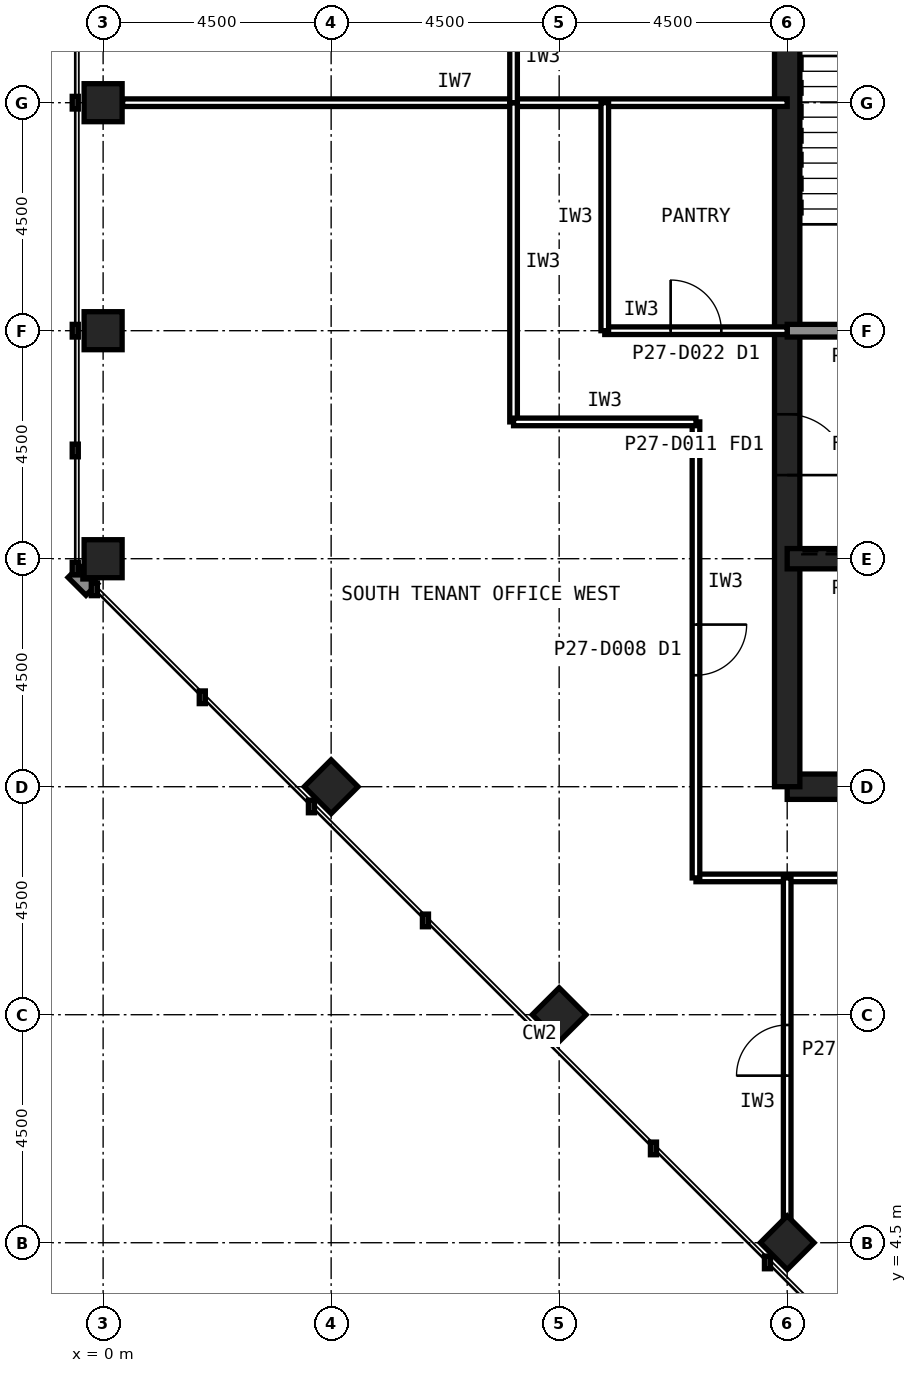
"""IFC4 building model, lengths in metres.
Left out: names, types, materials, properties, quantities, classifications, styles, units other than length and angle.
Written with IfcOpenShell. Run it as: python <this file> out.ifc"""

import sys

from ifc_helpers import new_model, si_unit, direction, frame, frame_2d, origin, origin_2d, place, context, subcontext, project, spatial, rectangle, hollow_rectangle, extrude, element, fill, save


model = new_model("IFC4")
c1 = context("Model", 3, precision=1e-05, world=origin(), true_north=direction((0.0, 1.0)))
c2 = subcontext(c1, "Body", "Model", "MODEL_VIEW")
j1 = project(units=[si_unit("LENGTHUNIT", "METRE"), si_unit("PLANEANGLEUNIT", "RADIAN")], contexts=[c1])
p1 = place(None, origin())
s1 = spatial("IfcSite", under=j1, at=p1, CompositionType="ELEMENT")
p2 = place(p1, origin())
s2 = spatial("IfcBuilding", under=s1, at=p2, CompositionType="ELEMENT")
p3 = place(p2, frame((0.0, 0.0, 119.6)))
s3 = spatial("IfcBuildingStorey", under=s2, at=p3, CompositionType="ELEMENT", Elevation=119.6)
for number, where, z_axis, x_axis in (
    (1, (0.0, 27.0, 0.0), (0.0, 0.0, 1.0), (1.0, 0.0, 0.0)),
    (2, (0.0, 22.5, 0.0), (0.0, 0.0, 1.0), (1.0, 0.0, 0.0)),
    (3, (0.0, 18.0, 0.0), (0.0, 0.0, 1.0), (1.0, 0.0, 0.0)),
    (4, (13.5, 4.5, 0.0), (0.0, 0.0, 1.0), (0.707, 0.707, 0.0)),
    (5, (9.0, 9.0, 0.0), (0.0, 0.0, 1.0), (0.707, 0.707, 0.0)),
    (6, (4.5, 13.5, 0.0), (0.0, 0.0, 1.0), (0.707, 0.707, 0.0)),
):
    element("IfcColumn", number, at=place(p3, frame(where, z_axis=z_axis, x_axis=x_axis)), inside=s3, PredefinedType="COLUMN", context=c2, shape_type="SweptSolid", body=[
        extrude(hollow_rectangle(XDim=0.75, YDim=0.75, WallThickness=0.04, at=origin_2d()), origin(), (0.0, 0.0, 1.0), 4.0),
    ])
p4 = place(p3, frame((13.5, 13.5, 0.0), z_axis=(0.0, 0.0, 1.0), x_axis=(1.0, 0.0, 0.0)))
e7 = element("IfcWall", 7, at=p4, inside=s3, PredefinedType="SHEAR", context=c2, shape_type="SweptSolid", body=[
    extrude(rectangle(XDim=27.0, YDim=0.5, at=frame_2d((13.5, 0.0))), origin(), (0.0, 0.0, 1.0), 4.0),
])
p5 = place(p3, frame((13.5, 40.5, 0.0), z_axis=(0.0, 0.0, 1.0), x_axis=(0.0, -1.0, 0.0)))
e8 = element("IfcWall", 8, at=p5, inside=s3, PredefinedType="SHEAR", context=c2, shape_type="SweptSolid", body=[
    extrude(rectangle(XDim=27.0, YDim=0.5, at=frame_2d((13.5, 0.0))), origin(), (0.0, 0.0, 1.0), 4.0),
])
p6 = place(p5, frame((19.65, 0.0, 0.0)))
e9 = element("IfcOpeningElement", 9, at=p6, cuts=e8, PredefinedType="OPENING", context=c2, shape_type="SweptSolid", body=[
    extrude(rectangle(XDim=1.2, YDim=2.1, at=frame_2d((0.6, 1.05))), frame((0.0, 0.26, 0.0), z_axis=(0.0, -1.0, 0.0), x_axis=(1.0, 0.0, 0.0)), (0.0, 0.0, 1.0), 0.52),
])
p7 = place(p5, frame((5.85, 0.0, 0.0)))
e10 = element("IfcOpeningElement", 10, at=p7, cuts=e8, PredefinedType="OPENING", context=c2, shape_type="SweptSolid", body=[
    extrude(rectangle(XDim=1.8, YDim=2.1, at=frame_2d((0.9, 1.05))), frame((0.0, 0.26, 0.0), z_axis=(0.0, -1.0, 0.0), x_axis=(1.0, 0.0, 0.0)), (0.0, 0.0, 1.0), 0.52),
])
p8 = place(p3, frame((13.5, 18.0, 0.0), z_axis=(0.0, 0.0, 1.0), x_axis=(1.0, 0.0, 0.0)))
e11 = element("IfcWall", 11, at=p8, inside=s3, PredefinedType="SHEAR", context=c2, shape_type="SweptSolid", body=[
    extrude(rectangle(XDim=27.0, YDim=0.4, at=frame_2d((13.5, 0.0))), origin(), (0.0, 0.0, 1.0), 4.0),
])
p9 = place(p8, frame((24.3, 0.0, 0.0)))
e12 = element("IfcOpeningElement", 12, at=p9, cuts=e11, PredefinedType="OPENING", context=c2, shape_type="SweptSolid", body=[
    extrude(rectangle(XDim=0.9, YDim=2.1, at=frame_2d((0.45, 1.05))), frame((0.0, 0.21, 0.0), z_axis=(0.0, -1.0, 0.0), x_axis=(1.0, 0.0, 0.0)), (0.0, 0.0, 1.0), 0.42),
])
p10 = place(p8, frame((5.45, 0.0, 0.0)))
e13 = element("IfcOpeningElement", 13, at=p10, cuts=e11, PredefinedType="OPENING", context=c2, shape_type="SweptSolid", body=[
    extrude(rectangle(XDim=1.1, YDim=2.1, at=frame_2d((0.55, 1.05))), frame((0.0, 0.21, 0.0), z_axis=(0.0, -1.0, 0.0), x_axis=(1.0, 0.0, 0.0)), (0.0, 0.0, 1.0), 0.42),
])
p11 = place(p8, frame((8.45, 0.0, 0.0)))
e14 = element("IfcOpeningElement", 14, at=p11, cuts=e11, PredefinedType="OPENING", context=c2, shape_type="SweptSolid", body=[
    extrude(rectangle(XDim=1.1, YDim=2.1, at=frame_2d((0.55, 1.05))), frame((0.0, 0.21, 0.0), z_axis=(0.0, -1.0, 0.0), x_axis=(1.0, 0.0, 0.0)), (0.0, 0.0, 1.0), 0.42),
])
p12 = place(p8, frame((11.45, 0.0, 0.0)))
e15 = element("IfcOpeningElement", 15, at=p12, cuts=e11, PredefinedType="OPENING", context=c2, shape_type="SweptSolid", body=[
    extrude(rectangle(XDim=1.1, YDim=2.1, at=frame_2d((0.55, 1.05))), frame((0.0, 0.21, 0.0), z_axis=(0.0, -1.0, 0.0), x_axis=(1.0, 0.0, 0.0)), (0.0, 0.0, 1.0), 0.42),
])
p13 = place(p8, frame((14.45, 0.0, 0.0)))
e16 = element("IfcOpeningElement", 16, at=p13, cuts=e11, PredefinedType="OPENING", context=c2, shape_type="SweptSolid", body=[
    extrude(rectangle(XDim=1.1, YDim=2.1, at=frame_2d((0.55, 1.05))), frame((0.0, 0.21, 0.0), z_axis=(0.0, -1.0, 0.0), x_axis=(1.0, 0.0, 0.0)), (0.0, 0.0, 1.0), 0.42),
])
p14 = place(p8, frame((17.45, 0.0, 0.0)))
e17 = element("IfcOpeningElement", 17, at=p14, cuts=e11, PredefinedType="OPENING", context=c2, shape_type="SweptSolid", body=[
    extrude(rectangle(XDim=1.1, YDim=2.1, at=frame_2d((0.55, 1.05))), frame((0.0, 0.21, 0.0), z_axis=(0.0, -1.0, 0.0), x_axis=(1.0, 0.0, 0.0)), (0.0, 0.0, 1.0), 0.42),
])
p15 = place(p8, frame((20.45, 0.0, 0.0)))
e18 = element("IfcOpeningElement", 18, at=p15, cuts=e11, PredefinedType="OPENING", context=c2, shape_type="SweptSolid", body=[
    extrude(rectangle(XDim=1.1, YDim=2.1, at=frame_2d((0.55, 1.05))), frame((0.0, 0.21, 0.0), z_axis=(0.0, -1.0, 0.0), x_axis=(1.0, 0.0, 0.0)), (0.0, 0.0, 1.0), 0.42),
])
p16 = place(p8, frame((1.6, 0.0, 0.0)))
e19 = element("IfcOpeningElement", 19, at=p16, cuts=e11, PredefinedType="OPENING", context=c2, shape_type="SweptSolid", body=[
    extrude(rectangle(XDim=1.3, YDim=2.2, at=frame_2d((0.65, 1.1))), frame((0.0, 0.21, 0.0), z_axis=(0.0, -1.0, 0.0), x_axis=(1.0, 0.0, 0.0)), (0.0, 0.0, 1.0), 0.42),
])
p17 = place(p3, frame((13.5, 22.5, 0.0), z_axis=(0.0, 0.0, 1.0), x_axis=(1.0, 0.0, 0.0)))
e20 = element("IfcWall", 20, at=p17, inside=s3, PredefinedType="SOLIDWALL", context=c2, shape_type="SweptSolid", body=[
    extrude(rectangle(XDim=27.0, YDim=0.25, at=frame_2d((13.5, 0.0))), origin(), (0.0, 0.0, 1.0), 3.84),
])
p18 = place(p17, frame((1.65, 0.0, 0.0)))
e21 = element("IfcOpeningElement", 21, at=p18, cuts=e20, PredefinedType="OPENING", context=c2, shape_type="SweptSolid", body=[
    extrude(rectangle(XDim=1.2, YDim=2.1, at=frame_2d((0.6, 1.05))), frame((0.0, 0.135, 0.0), z_axis=(0.0, -1.0, 0.0), x_axis=(1.0, 0.0, 0.0)), (0.0, 0.0, 1.0), 0.27),
])
p19 = place(p17, frame((6.025, 0.0, 0.0)))
e22 = element("IfcOpeningElement", 22, at=p19, cuts=e20, PredefinedType="OPENING", context=c2, shape_type="SweptSolid", body=[
    extrude(rectangle(XDim=1.0, YDim=2.1, at=frame_2d((0.5, 1.05))), frame((0.0, 0.135, 0.0), z_axis=(0.0, -1.0, 0.0), x_axis=(1.0, 0.0, 0.0)), (0.0, 0.0, 1.0), 0.27),
])
p20 = place(p17, frame((10.525, 0.0, 0.0)))
e23 = element("IfcOpeningElement", 23, at=p20, cuts=e20, PredefinedType="OPENING", context=c2, shape_type="SweptSolid", body=[
    extrude(rectangle(XDim=1.0, YDim=2.1, at=frame_2d((0.5, 1.05))), frame((0.0, 0.135, 0.0), z_axis=(0.0, -1.0, 0.0), x_axis=(1.0, 0.0, 0.0)), (0.0, 0.0, 1.0), 0.27),
])
p21 = place(p17, frame((19.75, 0.0, 0.0)))
e24 = element("IfcOpeningElement", 24, at=p21, cuts=e20, PredefinedType="OPENING", context=c2, shape_type="SweptSolid", body=[
    extrude(rectangle(XDim=1.0, YDim=2.1, at=frame_2d((0.5, 1.05))), frame((0.0, 0.135, 0.0), z_axis=(0.0, -1.0, 0.0), x_axis=(1.0, 0.0, 0.0)), (0.0, 0.0, 1.0), 0.27),
])
p22 = place(p17, frame((15.05, 0.0, 0.0)))
e25 = element("IfcOpeningElement", 25, at=p22, cuts=e20, PredefinedType="OPENING", context=c2, shape_type="SweptSolid", body=[
    extrude(rectangle(XDim=1.4, YDim=2.4, at=frame_2d((0.7, 1.2))), frame((0.0, 0.135, 0.0), z_axis=(0.0, -1.0, 0.0), x_axis=(1.0, 0.0, 0.0)), (0.0, 0.0, 1.0), 0.27),
])
p23 = place(p3, frame((0.385, 27.0, 0.0), z_axis=(0.0, 0.0, 1.0), x_axis=(1.0, 0.0, 0.0)))
e26 = element("IfcWall", 26, at=p23, inside=s3, PredefinedType="PARTITIONING", context=c2, shape_type="SweptSolid", body=[
    extrude(rectangle(XDim=13.115, YDim=0.15, at=frame_2d((6.558, 0.0))), origin(), (0.0, 0.0, 1.0), 2.989),
])
p24 = place(p3, frame((11.7, 11.7, 0.0), z_axis=(0.0, 0.0, 1.0), x_axis=(1.0, 0.0, 0.0)))
e27 = element("IfcWall", 27, at=p24, inside=s3, PredefinedType="PARTITIONING", context=c2, shape_type="SweptSolid", body=[
    extrude(rectangle(XDim=9.0, YDim=0.15, at=frame_2d((4.5, 0.0))), origin(), (0.0, 0.0, 1.0), 3.84),
])
p25 = place(p24, frame((4.0, 0.0, 0.0)))
e28 = element("IfcOpeningElement", 28, at=p25, cuts=e27, PredefinedType="OPENING", context=c2, shape_type="SweptSolid", body=[
    extrude(rectangle(XDim=1.0, YDim=2.1, at=frame_2d((0.5, 1.05))), frame((0.0, 0.085, 0.0), z_axis=(0.0, -1.0, 0.0), x_axis=(1.0, 0.0, 0.0)), (0.0, 0.0, 1.0), 0.17),
])
p26 = place(p3, frame((11.7, 20.7, 0.0), z_axis=(0.0, 0.0, 1.0), x_axis=(0.0, -1.0, 0.0)))
e29 = element("IfcWall", 29, at=p26, inside=s3, PredefinedType="PARTITIONING", context=c2, shape_type="SweptSolid", body=[
    extrude(rectangle(XDim=9.0, YDim=0.15, at=frame_2d((4.5, 0.0))), origin(), (0.0, 0.0, 1.0), 3.84),
])
p27 = place(p26, frame((4.0, 0.0, 0.0)))
e30 = element("IfcOpeningElement", 30, at=p27, cuts=e29, PredefinedType="OPENING", context=c2, shape_type="SweptSolid", body=[
    extrude(rectangle(XDim=1.0, YDim=2.1, at=frame_2d((0.5, 1.05))), frame((0.0, 0.085, 0.0), z_axis=(0.0, -1.0, 0.0), x_axis=(1.0, 0.0, 0.0)), (0.0, 0.0, 1.0), 0.17),
])
p28 = place(p3, frame((8.1, 27.0, 0.0), z_axis=(0.0, 0.0, 1.0), x_axis=(0.0, -1.0, 0.0)))
e31 = element("IfcWall", 31, at=p28, inside=s3, PredefinedType="PARTITIONING", context=c2, shape_type="SweptSolid", body=[
    extrude(rectangle(XDim=6.3, YDim=0.15, at=frame_2d((3.15, 0.0))), origin(), (0.0, 0.0, 1.0), 3.84),
])
p29 = place(p3, frame((8.1, 20.7, 0.0), z_axis=(0.0, 0.0, 1.0), x_axis=(1.0, 0.0, 0.0)))
e32 = element("IfcWall", 32, at=p29, inside=s3, PredefinedType="PARTITIONING", context=c2, shape_type="SweptSolid", body=[
    extrude(rectangle(XDim=3.6, YDim=0.15, at=frame_2d((1.8, 0.0))), origin(), (0.0, 0.0, 1.0), 3.84),
])
p30 = place(p3, frame((8.1, 28.8, 0.0), z_axis=(0.0, 0.0, 1.0), x_axis=(0.0, -1.0, 0.0)))
e33 = element("IfcWall", 33, at=p30, inside=s3, PredefinedType="PARTITIONING", context=c2, shape_type="SweptSolid", body=[
    extrude(rectangle(XDim=1.8, YDim=0.15, at=frame_2d((0.9, 0.0))), origin(), (0.0, 0.0, 1.0), 3.84),
])
p31 = place(p3, frame((9.9, 22.5, 0.0), z_axis=(0.0, 0.0, 1.0), x_axis=(1.0, 0.0, 0.0)))
e34 = element("IfcWall", 34, at=p31, inside=s3, PredefinedType="PARTITIONING", context=c2, shape_type="SweptSolid", body=[
    extrude(rectangle(XDim=3.6, YDim=0.15, at=frame_2d((1.8, 0.0))), origin(), (0.0, 0.0, 1.0), 2.989),
])
p32 = place(p31, frame((1.3, 0.0, 0.0)))
e35 = element("IfcOpeningElement", 35, at=p32, cuts=e34, PredefinedType="OPENING", context=c2, shape_type="SweptSolid", body=[
    extrude(rectangle(XDim=1.0, YDim=2.1, at=frame_2d((0.5, 1.05))), frame((0.0, 0.085, 0.0), z_axis=(0.0, -1.0, 0.0), x_axis=(1.0, 0.0, 0.0)), (0.0, 0.0, 1.0), 0.17),
])
p33 = place(p3, frame((9.9, 27.0, 0.0), z_axis=(0.0, 0.0, 1.0), x_axis=(0.0, -1.0, 0.0)))
e36 = element("IfcWall", 36, at=p33, inside=s3, PredefinedType="PARTITIONING", context=c2, shape_type="SweptSolid", body=[
    extrude(rectangle(XDim=4.5, YDim=0.15, at=frame_2d((2.25, 0.0))), origin(), (0.0, 0.0, 1.0), 3.84),
])
p34 = place(p3, frame((13.5, 4.895, 0.0), z_axis=(0.0, 0.0, 1.0), x_axis=(0.0, 1.0, 0.0)))
e37 = element("IfcWall", 37, at=p34, inside=s3, PredefinedType="PARTITIONING", context=c2, shape_type="SweptSolid", body=[
    extrude(rectangle(XDim=6.805, YDim=0.15, at=frame_2d((3.402, 0.0))), origin(), (0.0, 0.0, 1.0), 2.989),
])
p35 = place(p34, frame((2.903, 0.0, 0.0)))
e38 = element("IfcOpeningElement", 38, at=p35, cuts=e37, PredefinedType="OPENING", context=c2, shape_type="SweptSolid", body=[
    extrude(rectangle(XDim=1.0, YDim=2.1, at=frame_2d((0.5, 1.05))), frame((0.0, 0.085, 0.0), z_axis=(0.0, -1.0, 0.0), x_axis=(1.0, 0.0, 0.0)), (0.0, 0.0, 1.0), 0.17),
])
p36 = place(p6, origin())
e39 = element("IfcDoor", 39, at=p36, inside=s3, OperationType="SINGLE_SWING_RIGHT", PredefinedType="DOOR", context=c2, shape_type="SweptSolid", body=[
    extrude(rectangle(XDim=1.2, YDim=2.1, at=frame_2d((0.6, 1.05))), frame((0.0, 0.025, 0.0), z_axis=(0.0, -1.0, 0.0), x_axis=(1.0, 0.0, 0.0)), (0.0, 0.0, 1.0), 0.05),
])
fill(e9, e39)
p37 = place(p27, origin())
e40 = element("IfcDoor", 40, at=p37, inside=s3, OperationType="SINGLE_SWING_LEFT", PredefinedType="DOOR", context=c2, shape_type="SweptSolid", body=[
    extrude(rectangle(XDim=1.0, YDim=2.1, at=frame_2d((0.5, 1.05))), frame((0.0, 0.025, 0.0), z_axis=(0.0, -1.0, 0.0), x_axis=(1.0, 0.0, 0.0)), (0.0, 0.0, 1.0), 0.05),
])
fill(e30, e40)
p38 = place(p32, origin())
e41 = element("IfcDoor", 41, at=p38, inside=s3, OperationType="SINGLE_SWING_LEFT", PredefinedType="DOOR", context=c2, shape_type="SweptSolid", body=[
    extrude(rectangle(XDim=1.0, YDim=2.1, at=frame_2d((0.5, 1.05))), frame((0.0, 0.025, 0.0), z_axis=(0.0, -1.0, 0.0), x_axis=(1.0, 0.0, 0.0)), (0.0, 0.0, 1.0), 0.05),
])
fill(e35, e41)
p39 = place(p35, origin())
e42 = element("IfcDoor", 42, at=p39, inside=s3, OperationType="SINGLE_SWING_LEFT", PredefinedType="DOOR", context=c2, shape_type="SweptSolid", body=[
    extrude(rectangle(XDim=1.0, YDim=2.1, at=frame_2d((0.5, 1.05))), frame((0.0, 0.025, 0.0), z_axis=(0.0, -1.0, 0.0), x_axis=(1.0, 0.0, 0.0)), (0.0, 0.0, 1.0), 0.05),
])
fill(e38, e42)
save(model, sys.argv[1])
